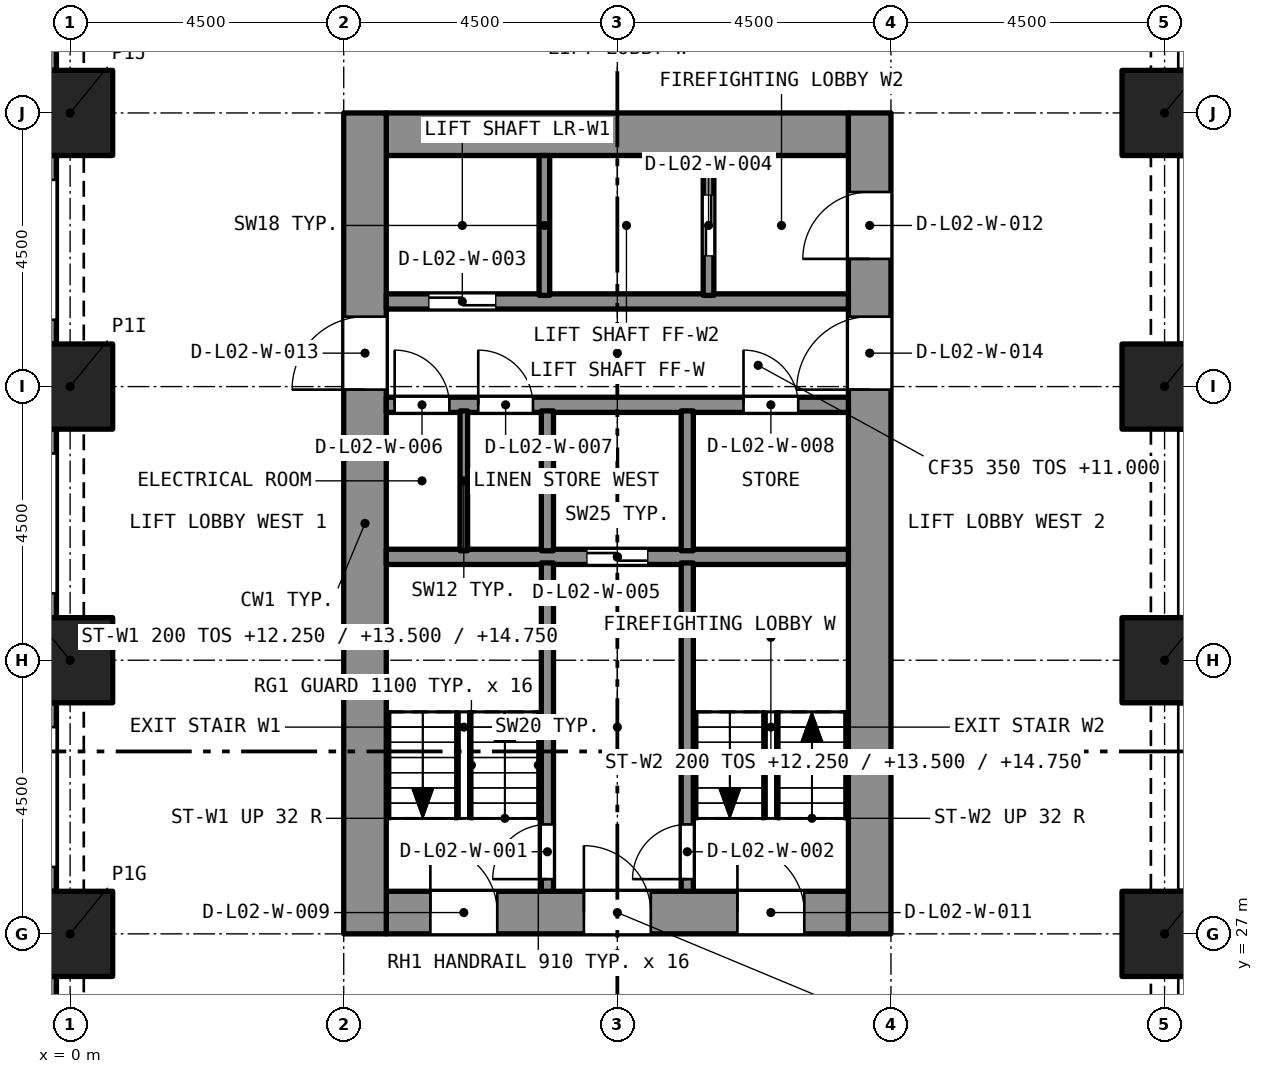
"""IFC4 building model, lengths in metres.
Left out: names, types, materials, properties, quantities, classifications, styles, units other than length and angle.
Written with IfcOpenShell. Run it as: python <this file> out.ifc"""

import sys

from ifc_helpers import new_model, si_unit, direction, frame, frame_2d, origin, origin_2d, place, context, subcontext, project, spatial, rectangle, extrude, element, fill, save


model = new_model("IFC4")
c1 = context("Model", 3, precision=1e-05, world=origin(), true_north=direction((0.0, 1.0)))
c2 = subcontext(c1, "Body", "Model", "MODEL_VIEW")
j1 = project(units=[si_unit("LENGTHUNIT", "METRE"), si_unit("PLANEANGLEUNIT", "RADIAN")], contexts=[c1])
p1 = place(None, origin())
s1 = spatial("IfcSite", under=j1, at=p1, CompositionType="ELEMENT")
p2 = place(p1, origin())
s2 = spatial("IfcBuilding", under=s1, at=p2, CompositionType="ELEMENT")
p3 = place(p2, frame((0.0, 0.0, 11.0)))
s3 = spatial("IfcBuildingStorey", under=s2, at=p3, CompositionType="ELEMENT", Elevation=11.0)
for number, where, z_axis, x_axis in (
    (1, (0.0, 27.0, 0.0), (0.0, 0.0, 1.0), (1.0, 0.0, 0.0)),
    (2, (18.0, 27.0, 0.0), (0.0, 0.0, 1.0), (1.0, 0.0, 0.0)),
    (3, (0.0, 31.5, 0.0), (0.0, 0.0, 1.0), (1.0, 0.0, 0.0)),
    (4, (18.0, 31.5, 0.0), (0.0, 0.0, 1.0), (1.0, 0.0, 0.0)),
    (5, (0.0, 36.0, 0.0), (0.0, 0.0, 1.0), (1.0, 0.0, 0.0)),
    (6, (18.0, 36.0, 0.0), (0.0, 0.0, 1.0), (1.0, 0.0, 0.0)),
    (7, (0.0, 40.5, 0.0), (0.0, 0.0, 1.0), (1.0, 0.0, 0.0)),
    (8, (18.0, 40.5, 0.0), (0.0, 0.0, 1.0), (1.0, 0.0, 0.0)),
):
    element("IfcColumn", number, at=place(p3, frame(where, z_axis=z_axis, x_axis=x_axis)), inside=s3, PredefinedType="COLUMN", context=c2, shape_type="SweptSolid", body=[
        extrude(rectangle(XDim=1.4, YDim=1.4, at=origin_2d()), origin(), (0.0, 0.0, 1.0), 5.0),
    ])
p4 = place(p3, frame((5.2, 27.35, 0.0), z_axis=(0.0, 0.0, 1.0), x_axis=(1.0, 0.0, 0.0)))
e9 = element("IfcWall", 9, at=p4, inside=s3, PredefinedType="SOLIDWALL", context=c2, shape_type="SweptSolid", body=[
    extrude(rectangle(XDim=7.6, YDim=0.7, at=frame_2d((3.8, 0.0))), origin(), (0.0, 0.0, 1.0), 5.0),
])
p5 = place(p4, frame((0.725, 0.0, 0.0)))
e10 = element("IfcOpeningElement", 10, at=p5, cuts=e9, PredefinedType="OPENING", context=c2, shape_type="SweptSolid", body=[
    extrude(rectangle(XDim=1.1, YDim=2.1, at=frame_2d((0.55, 1.05))), frame((0.0, 0.36, 0.0), z_axis=(0.0, -1.0, 0.0), x_axis=(1.0, 0.0, 0.0)), (0.0, 0.0, 1.0), 0.72),
])
p6 = place(p4, frame((3.25, 0.0, 0.0)))
e11 = element("IfcOpeningElement", 11, at=p6, cuts=e9, PredefinedType="OPENING", context=c2, shape_type="SweptSolid", body=[
    extrude(rectangle(XDim=1.1, YDim=2.1, at=frame_2d((0.55, 1.05))), frame((0.0, 0.36, 0.0), z_axis=(0.0, -1.0, 0.0), x_axis=(1.0, 0.0, 0.0)), (0.0, 0.0, 1.0), 0.72),
])
p7 = place(p4, frame((5.775, 0.0, 0.0)))
e12 = element("IfcOpeningElement", 12, at=p7, cuts=e9, PredefinedType="OPENING", context=c2, shape_type="SweptSolid", body=[
    extrude(rectangle(XDim=1.1, YDim=2.1, at=frame_2d((0.55, 1.05))), frame((0.0, 0.36, 0.0), z_axis=(0.0, -1.0, 0.0), x_axis=(1.0, 0.0, 0.0)), (0.0, 0.0, 1.0), 0.72),
])
p8 = place(p3, frame((5.2, 40.15, 0.0), z_axis=(0.0, 0.0, 1.0), x_axis=(1.0, 0.0, 0.0)))
e13 = element("IfcWall", 13, at=p8, inside=s3, PredefinedType="SOLIDWALL", context=c2, shape_type="SweptSolid", body=[
    extrude(rectangle(XDim=7.6, YDim=0.7, at=frame_2d((3.8, 0.0))), origin(), (0.0, 0.0, 1.0), 5.0),
])
p9 = place(p3, frame((4.85, 27.0, 0.0), z_axis=(0.0, 0.0, 1.0), x_axis=(0.0, 1.0, 0.0)))
e14 = element("IfcWall", 14, at=p9, inside=s3, PredefinedType="SOLIDWALL", context=c2, shape_type="SweptSolid", body=[
    extrude(rectangle(XDim=13.5, YDim=0.7, at=frame_2d((6.75, 0.0))), origin(), (0.0, 0.0, 1.0), 5.0),
])
p10 = place(p9, frame((8.95, 0.0, 0.0)))
e15 = element("IfcOpeningElement", 15, at=p10, cuts=e14, PredefinedType="OPENING", context=c2, shape_type="SweptSolid", body=[
    extrude(rectangle(XDim=1.2, YDim=2.1, at=frame_2d((0.6, 1.05))), frame((0.0, 0.36, 0.0), z_axis=(0.0, -1.0, 0.0), x_axis=(1.0, 0.0, 0.0)), (0.0, 0.0, 1.0), 0.72),
])
p11 = place(p3, frame((13.15, 27.0, 0.0), z_axis=(0.0, 0.0, 1.0), x_axis=(0.0, 1.0, 0.0)))
e16 = element("IfcWall", 16, at=p11, inside=s3, PredefinedType="SOLIDWALL", context=c2, shape_type="SweptSolid", body=[
    extrude(rectangle(XDim=13.5, YDim=0.7, at=frame_2d((6.75, 0.0))), origin(), (0.0, 0.0, 1.0), 5.0),
])
p12 = place(p11, frame((11.1, 0.0, 0.0)))
e17 = element("IfcOpeningElement", 17, at=p12, cuts=e16, PredefinedType="OPENING", context=c2, shape_type="SweptSolid", body=[
    extrude(rectangle(XDim=1.1, YDim=2.1, at=frame_2d((0.55, 1.05))), frame((0.0, 0.36, 0.0), z_axis=(0.0, -1.0, 0.0), x_axis=(1.0, 0.0, 0.0)), (0.0, 0.0, 1.0), 0.72),
])
p13 = place(p11, frame((8.95, 0.0, 0.0)))
e18 = element("IfcOpeningElement", 18, at=p13, cuts=e16, PredefinedType="OPENING", context=c2, shape_type="SweptSolid", body=[
    extrude(rectangle(XDim=1.2, YDim=2.1, at=frame_2d((0.6, 1.05))), frame((0.0, 0.36, 0.0), z_axis=(0.0, -1.0, 0.0), x_axis=(1.0, 0.0, 0.0)), (0.0, 0.0, 1.0), 0.72),
])
p14 = place(p3, frame((-0.375, 41.2, 0.0), z_axis=(0.0, 0.0, 1.0), x_axis=(0.0, 1.0, 0.0)))
e19 = element("IfcWall", 19, at=p14, inside=s3, PredefinedType="SOLIDWALL", context=c2, shape_type="SweptSolid", body=[
    extrude(rectangle(XDim=3.1, YDim=0.3, at=frame_2d((1.55, 0.0))), origin(), (0.0, 0.0, 1.0), 5.0),
])
p15 = place(p14, frame((0.4, 0.0, 0.45)))
e20 = element("IfcOpeningElement", 20, at=p15, cuts=e19, PredefinedType="OPENING", context=c2, shape_type="SweptSolid", body=[
    extrude(rectangle(XDim=2.3, YDim=3.3, at=frame_2d((1.15, 1.65))), frame((0.0, 0.16, 0.0), z_axis=(0.0, -1.0, 0.0), x_axis=(1.0, 0.0, 0.0)), (0.0, 0.0, 1.0), 0.32),
])
p16 = place(p3, frame((-0.375, 36.7, 0.0), z_axis=(0.0, 0.0, 1.0), x_axis=(0.0, 1.0, 0.0)))
e21 = element("IfcWall", 21, at=p16, inside=s3, PredefinedType="SOLIDWALL", context=c2, shape_type="SweptSolid", body=[
    extrude(rectangle(XDim=3.1, YDim=0.3, at=frame_2d((1.55, 0.0))), origin(), (0.0, 0.0, 1.0), 5.0),
])
p17 = place(p16, frame((0.4, 0.0, 0.45)))
e22 = element("IfcOpeningElement", 22, at=p17, cuts=e21, PredefinedType="OPENING", context=c2, shape_type="SweptSolid", body=[
    extrude(rectangle(XDim=2.3, YDim=3.3, at=frame_2d((1.15, 1.65))), frame((0.0, 0.16, 0.0), z_axis=(0.0, -1.0, 0.0), x_axis=(1.0, 0.0, 0.0)), (0.0, 0.0, 1.0), 0.32),
])
p18 = place(p3, frame((-0.375, 32.2, 0.0), z_axis=(0.0, 0.0, 1.0), x_axis=(0.0, 1.0, 0.0)))
e23 = element("IfcWall", 23, at=p18, inside=s3, PredefinedType="SOLIDWALL", context=c2, shape_type="SweptSolid", body=[
    extrude(rectangle(XDim=3.1, YDim=0.3, at=frame_2d((1.55, 0.0))), origin(), (0.0, 0.0, 1.0), 5.0),
])
p19 = place(p18, frame((0.4, 0.0, 0.45)))
e24 = element("IfcOpeningElement", 24, at=p19, cuts=e23, PredefinedType="OPENING", context=c2, shape_type="SweptSolid", body=[
    extrude(rectangle(XDim=2.3, YDim=3.3, at=frame_2d((1.15, 1.65))), frame((0.0, 0.16, 0.0), z_axis=(0.0, -1.0, 0.0), x_axis=(1.0, 0.0, 0.0)), (0.0, 0.0, 1.0), 0.32),
])
p20 = place(p3, frame((-0.375, 27.7, 0.0), z_axis=(0.0, 0.0, 1.0), x_axis=(0.0, 1.0, 0.0)))
e25 = element("IfcWall", 25, at=p20, inside=s3, PredefinedType="SOLIDWALL", context=c2, shape_type="SweptSolid", body=[
    extrude(rectangle(XDim=3.1, YDim=0.3, at=frame_2d((1.55, 0.0))), origin(), (0.0, 0.0, 1.0), 5.0),
])
p21 = place(p20, frame((0.4, 0.0, 0.45)))
e26 = element("IfcOpeningElement", 26, at=p21, cuts=e25, PredefinedType="OPENING", context=c2, shape_type="SweptSolid", body=[
    extrude(rectangle(XDim=2.3, YDim=3.3, at=frame_2d((1.15, 1.65))), frame((0.0, 0.16, 0.0), z_axis=(0.0, -1.0, 0.0), x_axis=(1.0, 0.0, 0.0)), (0.0, 0.0, 1.0), 0.32),
])
p22 = place(p3, frame((-0.375, 23.2, 0.0), z_axis=(0.0, 0.0, 1.0), x_axis=(0.0, 1.0, 0.0)))
e27 = element("IfcWall", 27, at=p22, inside=s3, PredefinedType="SOLIDWALL", context=c2, shape_type="SweptSolid", body=[
    extrude(rectangle(XDim=3.1, YDim=0.3, at=frame_2d((1.55, 0.0))), origin(), (0.0, 0.0, 1.0), 5.0),
])
p23 = place(p22, frame((0.4, 0.0, 0.45)))
e28 = element("IfcOpeningElement", 28, at=p23, cuts=e27, PredefinedType="OPENING", context=c2, shape_type="SweptSolid", body=[
    extrude(rectangle(XDim=2.3, YDim=3.3, at=frame_2d((1.15, 1.65))), frame((0.0, 0.16, 0.0), z_axis=(0.0, -1.0, 0.0), x_axis=(1.0, 0.0, 0.0)), (0.0, 0.0, 1.0), 0.32),
])
p24 = place(p3, frame((5.2, 33.2, 0.0), z_axis=(0.0, 0.0, 1.0), x_axis=(1.0, 0.0, 0.0)))
e29 = element("IfcWall", 29, at=p24, inside=s3, PredefinedType="SOLIDWALL", context=c2, shape_type="SweptSolid", body=[
    extrude(rectangle(XDim=7.6, YDim=0.25, at=frame_2d((3.8, 0.0))), origin(), (0.0, 0.0, 1.0), 4.65),
])
p25 = place(p24, frame((3.3, 0.0, 0.0)))
e30 = element("IfcOpeningElement", 30, at=p25, cuts=e29, PredefinedType="OPENING", context=c2, shape_type="SweptSolid", body=[
    extrude(rectangle(XDim=1.0, YDim=2.1, at=frame_2d((0.5, 1.05))), frame((0.0, 0.135, 0.0), z_axis=(0.0, -1.0, 0.0), x_axis=(1.0, 0.0, 0.0)), (0.0, 0.0, 1.0), 0.27),
])
p26 = place(p3, frame((5.2, 35.7, 0.0), z_axis=(0.0, 0.0, 1.0), x_axis=(1.0, 0.0, 0.0)))
e31 = element("IfcWall", 31, at=p26, inside=s3, PredefinedType="SOLIDWALL", context=c2, shape_type="SweptSolid", body=[
    extrude(rectangle(XDim=7.6, YDim=0.25, at=frame_2d((3.8, 0.0))), origin(), (0.0, 0.0, 1.0), 4.65),
])
p27 = place(p26, frame((0.137, 0.0, 0.0)))
e32 = element("IfcOpeningElement", 32, at=p27, cuts=e31, PredefinedType="OPENING", context=c2, shape_type="SweptSolid", body=[
    extrude(rectangle(XDim=0.9, YDim=2.1, at=frame_2d((0.45, 1.05))), frame((0.0, 0.135, 0.0), z_axis=(0.0, -1.0, 0.0), x_axis=(1.0, 0.0, 0.0)), (0.0, 0.0, 1.0), 0.27),
])
p28 = place(p26, frame((1.512, 0.0, 0.0)))
e33 = element("IfcOpeningElement", 33, at=p28, cuts=e31, PredefinedType="OPENING", context=c2, shape_type="SweptSolid", body=[
    extrude(rectangle(XDim=0.9, YDim=2.1, at=frame_2d((0.45, 1.05))), frame((0.0, 0.135, 0.0), z_axis=(0.0, -1.0, 0.0), x_axis=(1.0, 0.0, 0.0)), (0.0, 0.0, 1.0), 0.27),
])
p29 = place(p26, frame((5.875, 0.0, 0.0)))
e34 = element("IfcOpeningElement", 34, at=p29, cuts=e31, PredefinedType="OPENING", context=c2, shape_type="SweptSolid", body=[
    extrude(rectangle(XDim=0.9, YDim=2.1, at=frame_2d((0.45, 1.05))), frame((0.0, 0.135, 0.0), z_axis=(0.0, -1.0, 0.0), x_axis=(1.0, 0.0, 0.0)), (0.0, 0.0, 1.0), 0.27),
])
p30 = place(p3, frame((5.2, 37.4, 0.0), z_axis=(0.0, 0.0, 1.0), x_axis=(1.0, 0.0, 0.0)))
e35 = element("IfcWall", 35, at=p30, inside=s3, PredefinedType="SOLIDWALL", context=c2, shape_type="SweptSolid", body=[
    extrude(rectangle(XDim=7.6, YDim=0.25, at=frame_2d((3.8, 0.0))), origin(), (0.0, 0.0, 1.0), 4.65),
])
p31 = place(p30, frame((0.7, 0.0, 0.0)))
e36 = element("IfcOpeningElement", 36, at=p31, cuts=e35, PredefinedType="OPENING", context=c2, shape_type="SweptSolid", body=[
    extrude(rectangle(XDim=1.1, YDim=2.4, at=frame_2d((0.55, 1.2))), frame((0.0, 0.135, 0.0), z_axis=(0.0, -1.0, 0.0), x_axis=(1.0, 0.0, 0.0)), (0.0, 0.0, 1.0), 0.27),
])
p32 = place(p3, frame((7.85, 27.7, 0.0), z_axis=(0.0, 0.0, 1.0), x_axis=(0.0, 1.0, 0.0)))
e37 = element("IfcWall", 37, at=p32, inside=s3, PredefinedType="SOLIDWALL", context=c2, shape_type="SweptSolid", body=[
    extrude(rectangle(XDim=5.4, YDim=0.2, at=frame_2d((2.7, 0.0))), origin(), (0.0, 0.0, 1.0), 4.65),
])
p33 = place(p32, frame((0.2, 0.0, 0.0)))
e38 = element("IfcOpeningElement", 38, at=p33, cuts=e37, PredefinedType="OPENING", context=c2, shape_type="SweptSolid", body=[
    extrude(rectangle(XDim=0.9, YDim=2.1, at=frame_2d((0.45, 1.05))), frame((0.0, 0.11, 0.0), z_axis=(0.0, -1.0, 0.0), x_axis=(1.0, 0.0, 0.0)), (0.0, 0.0, 1.0), 0.22),
])
p34 = place(p3, frame((10.15, 27.7, 0.0), z_axis=(0.0, 0.0, 1.0), x_axis=(0.0, 1.0, 0.0)))
e39 = element("IfcWall", 39, at=p34, inside=s3, PredefinedType="SOLIDWALL", context=c2, shape_type="SweptSolid", body=[
    extrude(rectangle(XDim=5.4, YDim=0.2, at=frame_2d((2.7, 0.0))), origin(), (0.0, 0.0, 1.0), 4.65),
])
p35 = place(p34, frame((0.2, 0.0, 0.0)))
e40 = element("IfcOpeningElement", 40, at=p35, cuts=e39, PredefinedType="OPENING", context=c2, shape_type="SweptSolid", body=[
    extrude(rectangle(XDim=0.9, YDim=2.1, at=frame_2d((0.45, 1.05))), frame((0.0, 0.11, 0.0), z_axis=(0.0, -1.0, 0.0), x_axis=(1.0, 0.0, 0.0)), (0.0, 0.0, 1.0), 0.22),
])
for number, where, z_axis, x_axis in (
    (41, (7.85, 33.3, 0.0), (0.0, 0.0, 1.0), (0.0, 1.0, 0.0)),
    (42, (10.15, 33.3, 0.0), (0.0, 0.0, 1.0), (0.0, 1.0, 0.0)),
):
    element("IfcWall", number, at=place(p3, frame(where, z_axis=z_axis, x_axis=x_axis)), inside=s3, PredefinedType="SOLIDWALL", context=c2, shape_type="SweptSolid", body=[
        extrude(rectangle(XDim=2.3, YDim=0.2, at=frame_2d((1.15, 0.0))), origin(), (0.0, 0.0, 1.0), 4.65),
    ])
p36 = place(p3, frame((7.8, 37.5, 0.0), z_axis=(0.0, 0.0, 1.0), x_axis=(0.0, 1.0, 0.0)))
e43 = element("IfcWall", 43, at=p36, inside=s3, PredefinedType="SOLIDWALL", context=c2, shape_type="SweptSolid", body=[
    extrude(rectangle(XDim=2.3, YDim=0.175, at=frame_2d((1.15, 0.0))), origin(), (0.0, 0.0, 1.0), 4.65),
])
p37 = place(p3, frame((10.5, 37.5, 0.0), z_axis=(0.0, 0.0, 1.0), x_axis=(0.0, 1.0, 0.0)))
e44 = element("IfcWall", 44, at=p37, inside=s3, PredefinedType="SOLIDWALL", context=c2, shape_type="SweptSolid", body=[
    extrude(rectangle(XDim=2.3, YDim=0.175, at=frame_2d((1.15, 0.0))), origin(), (0.0, 0.0, 1.0), 4.65),
])
p38 = place(p37, frame((0.65, 0.0, 0.0)))
e45 = element("IfcOpeningElement", 45, at=p38, cuts=e44, PredefinedType="OPENING", context=c2, shape_type="SweptSolid", body=[
    extrude(rectangle(XDim=1.0, YDim=2.1, at=frame_2d((0.5, 1.05))), frame((0.0, 0.097, 0.0), z_axis=(0.0, -1.0, 0.0), x_axis=(1.0, 0.0, 0.0)), (0.0, 0.0, 1.0), 0.195),
])
p39 = place(p3, frame((6.475, 33.3, 0.0), z_axis=(0.0, 0.0, 1.0), x_axis=(0.0, 1.0, 0.0)))
e46 = element("IfcWall", 46, at=p39, inside=s3, PredefinedType="PARTITIONING", context=c2, shape_type="SweptSolid", body=[
    extrude(rectangle(XDim=2.3, YDim=0.125, at=frame_2d((1.15, 0.0))), origin(), (0.0, 0.0, 1.0), 4.65),
])
p40 = place(p33, origin())
e47 = element("IfcDoor", 47, at=p40, inside=s3, OperationType="SINGLE_SWING_LEFT", PredefinedType="DOOR", context=c2, shape_type="SweptSolid", body=[
    extrude(rectangle(XDim=0.9, YDim=2.1, at=frame_2d((0.45, 1.05))), frame((0.0, 0.025, 0.0), z_axis=(0.0, -1.0, 0.0), x_axis=(1.0, 0.0, 0.0)), (0.0, 0.0, 1.0), 0.05),
])
fill(e38, e47)
p41 = place(p35, origin())
e48 = element("IfcDoor", 48, at=p41, inside=s3, OperationType="SINGLE_SWING_LEFT", PredefinedType="DOOR", context=c2, shape_type="SweptSolid", body=[
    extrude(rectangle(XDim=0.9, YDim=2.1, at=frame_2d((0.45, 1.05))), frame((0.0, 0.025, 0.0), z_axis=(0.0, -1.0, 0.0), x_axis=(1.0, 0.0, 0.0)), (0.0, 0.0, 1.0), 0.05),
])
fill(e40, e48)
p42 = place(p31, origin())
e49 = element("IfcDoor", 49, at=p42, inside=s3, OperationType="SLIDING_TO_LEFT", PredefinedType="DOOR", context=c2, shape_type="SweptSolid", body=[
    extrude(rectangle(XDim=1.1, YDim=2.4, at=frame_2d((0.55, 1.2))), frame((0.0, 0.025, 0.0), z_axis=(0.0, -1.0, 0.0), x_axis=(1.0, 0.0, 0.0)), (0.0, 0.0, 1.0), 0.05),
])
fill(e36, e49)
p43 = place(p38, origin())
e50 = element("IfcDoor", 50, at=p43, inside=s3, OperationType="SLIDING_TO_LEFT", PredefinedType="DOOR", context=c2, shape_type="SweptSolid", body=[
    extrude(rectangle(XDim=1.0, YDim=2.1, at=frame_2d((0.5, 1.05))), frame((0.0, 0.025, 0.0), z_axis=(0.0, -1.0, 0.0), x_axis=(1.0, 0.0, 0.0)), (0.0, 0.0, 1.0), 0.05),
])
fill(e45, e50)
p44 = place(p25, origin())
e51 = element("IfcDoor", 51, at=p44, inside=s3, OperationType="SLIDING_TO_LEFT", PredefinedType="DOOR", context=c2, shape_type="SweptSolid", body=[
    extrude(rectangle(XDim=1.0, YDim=2.1, at=frame_2d((0.5, 1.05))), frame((0.0, 0.025, 0.0), z_axis=(0.0, -1.0, 0.0), x_axis=(1.0, 0.0, 0.0)), (0.0, 0.0, 1.0), 0.05),
])
fill(e30, e51)
p45 = place(p27, origin())
e52 = element("IfcDoor", 52, at=p45, inside=s3, OperationType="SINGLE_SWING_LEFT", PredefinedType="DOOR", context=c2, shape_type="SweptSolid", body=[
    extrude(rectangle(XDim=0.9, YDim=2.1, at=frame_2d((0.45, 1.05))), frame((0.0, 0.025, 0.0), z_axis=(0.0, -1.0, 0.0), x_axis=(1.0, 0.0, 0.0)), (0.0, 0.0, 1.0), 0.05),
])
fill(e32, e52)
p46 = place(p28, origin())
e53 = element("IfcDoor", 53, at=p46, inside=s3, OperationType="SINGLE_SWING_LEFT", PredefinedType="DOOR", context=c2, shape_type="SweptSolid", body=[
    extrude(rectangle(XDim=0.9, YDim=2.1, at=frame_2d((0.45, 1.05))), frame((0.0, 0.025, 0.0), z_axis=(0.0, -1.0, 0.0), x_axis=(1.0, 0.0, 0.0)), (0.0, 0.0, 1.0), 0.05),
])
fill(e33, e53)
p47 = place(p29, origin())
e54 = element("IfcDoor", 54, at=p47, inside=s3, OperationType="SINGLE_SWING_LEFT", PredefinedType="DOOR", context=c2, shape_type="SweptSolid", body=[
    extrude(rectangle(XDim=0.9, YDim=2.1, at=frame_2d((0.45, 1.05))), frame((0.0, 0.025, 0.0), z_axis=(0.0, -1.0, 0.0), x_axis=(1.0, 0.0, 0.0)), (0.0, 0.0, 1.0), 0.05),
])
fill(e34, e54)
p48 = place(p5, origin())
e55 = element("IfcDoor", 55, at=p48, inside=s3, OperationType="SINGLE_SWING_LEFT", PredefinedType="DOOR", context=c2, shape_type="SweptSolid", body=[
    extrude(rectangle(XDim=1.1, YDim=2.1, at=frame_2d((0.55, 1.05))), frame((0.0, 0.025, 0.0), z_axis=(0.0, -1.0, 0.0), x_axis=(1.0, 0.0, 0.0)), (0.0, 0.0, 1.0), 0.05),
])
fill(e10, e55)
p49 = place(p6, origin())
e56 = element("IfcDoor", 56, at=p49, inside=s3, OperationType="SINGLE_SWING_LEFT", PredefinedType="DOOR", context=c2, shape_type="SweptSolid", body=[
    extrude(rectangle(XDim=1.1, YDim=2.1, at=frame_2d((0.55, 1.05))), frame((0.0, 0.025, 0.0), z_axis=(0.0, -1.0, 0.0), x_axis=(1.0, 0.0, 0.0)), (0.0, 0.0, 1.0), 0.05),
])
fill(e11, e56)
p50 = place(p7, origin())
e57 = element("IfcDoor", 57, at=p50, inside=s3, OperationType="SINGLE_SWING_LEFT", PredefinedType="DOOR", context=c2, shape_type="SweptSolid", body=[
    extrude(rectangle(XDim=1.1, YDim=2.1, at=frame_2d((0.55, 1.05))), frame((0.0, 0.025, 0.0), z_axis=(0.0, -1.0, 0.0), x_axis=(1.0, 0.0, 0.0)), (0.0, 0.0, 1.0), 0.05),
])
fill(e12, e57)
p51 = place(p12, origin())
e58 = element("IfcDoor", 58, at=p51, inside=s3, OperationType="SINGLE_SWING_LEFT", PredefinedType="DOOR", context=c2, shape_type="SweptSolid", body=[
    extrude(rectangle(XDim=1.1, YDim=2.1, at=frame_2d((0.55, 1.05))), frame((0.0, 0.025, 0.0), z_axis=(0.0, -1.0, 0.0), x_axis=(1.0, 0.0, 0.0)), (0.0, 0.0, 1.0), 0.05),
])
fill(e17, e58)
p52 = place(p10, origin())
e59 = element("IfcDoor", 59, at=p52, inside=s3, OperationType="SINGLE_SWING_LEFT", PredefinedType="DOOR", context=c2, shape_type="SweptSolid", body=[
    extrude(rectangle(XDim=1.2, YDim=2.1, at=frame_2d((0.6, 1.05))), frame((0.0, 0.025, 0.0), z_axis=(0.0, -1.0, 0.0), x_axis=(1.0, 0.0, 0.0)), (0.0, 0.0, 1.0), 0.05),
])
fill(e15, e59)
p53 = place(p13, origin())
e60 = element("IfcDoor", 60, at=p53, inside=s3, OperationType="SINGLE_SWING_LEFT", PredefinedType="DOOR", context=c2, shape_type="SweptSolid", body=[
    extrude(rectangle(XDim=1.2, YDim=2.1, at=frame_2d((0.6, 1.05))), frame((0.0, 0.025, 0.0), z_axis=(0.0, -1.0, 0.0), x_axis=(1.0, 0.0, 0.0)), (0.0, 0.0, 1.0), 0.05),
])
fill(e18, e60)
save(model, sys.argv[1])
